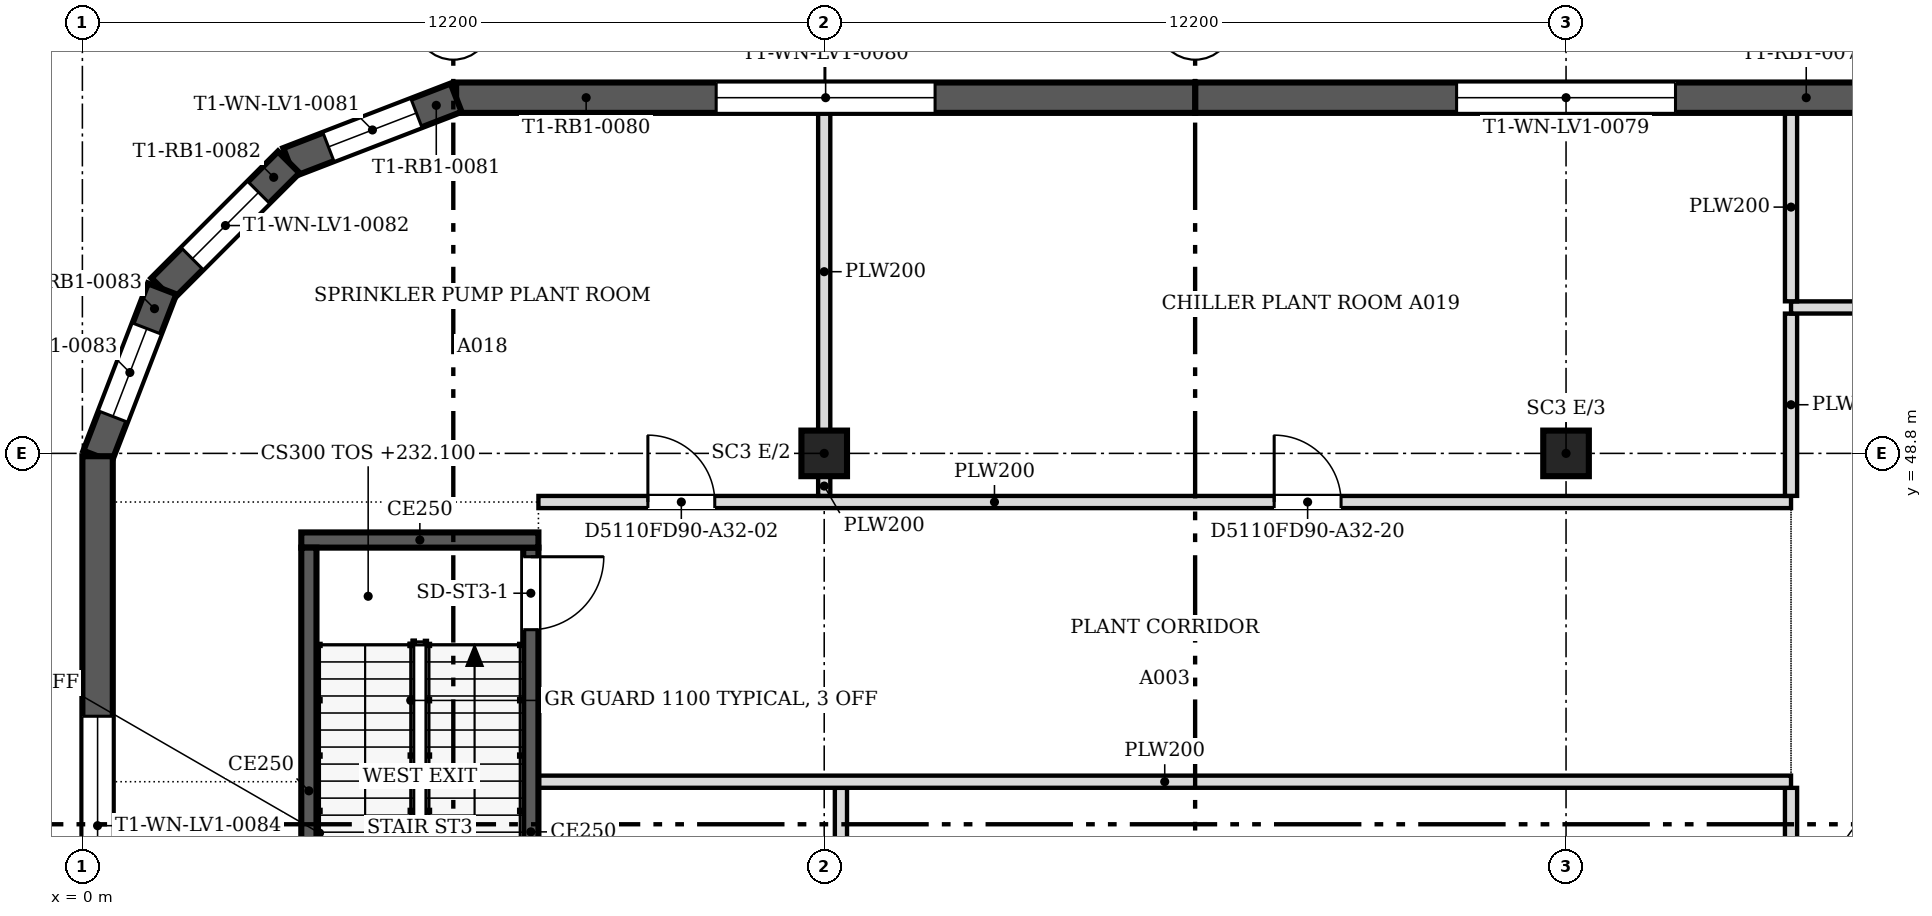
"""IFC4 building model, lengths in metres.
Left out: names, types, materials, properties, quantities, classifications, styles, units other than length and angle.
Written with IfcOpenShell. Run it as: python <this file> out.ifc"""

import sys

from ifc_helpers import new_model, si_unit, direction, frame, frame_2d, origin, origin_2d, place, context, subcontext, project, spatial, polyline, rectangle, outline, extrude, faceted_brep, source, transform, mapped, element, fill, save


model = new_model("IFC4")
c1 = context("Model", 3, precision=1e-05, world=origin(), true_north=direction((0.0, 1.0)))
c2 = subcontext(c1, "Body", "Model", "MODEL_VIEW")
j1 = project(units=[si_unit("LENGTHUNIT", "METRE"), si_unit("PLANEANGLEUNIT", "RADIAN")], contexts=[c1])
p1 = place(None, origin())
s1 = spatial("IfcSite", under=j1, at=p1, CompositionType="ELEMENT")
p2 = place(p1, origin())
s2 = spatial("IfcBuilding", under=s1, at=p2, CompositionType="ELEMENT")
p3 = place(p2, frame((0.0, 0.0, 232.1)))
s3 = spatial("IfcBuildingStorey", under=s2, at=p3, CompositionType="ELEMENT", Elevation=232.1)
for number, where, z_axis, x_axis in (
    (1, (12.2, 48.8, 0.0), (0.0, 0.0, 1.0), (1.0, 0.0, 0.0)),
    (2, (24.4, 48.8, 0.0), (0.0, 0.0, 1.0), (1.0, 0.0, 0.0)),
):
    element("IfcColumn", number, at=place(p3, frame(where, z_axis=z_axis, x_axis=x_axis)), inside=s3, PredefinedType="COLUMN", context=c2, shape_type="SweptSolid", body=[
        extrude(rectangle(XDim=0.75, YDim=0.75, at=origin_2d()), origin(), (0.0, 0.0, 1.0), 4.6),
    ])
m1 = source(origin(), c2, "Body", "SweptSolid", [
    extrude(outline(polyline([(0.0, 0.0), (12.2, 0.0), (12.2, 4.8), (0.0, 4.8), (0.0, 0.0)])), frame((0.0, 0.25, 0.0), z_axis=(0.0, -1.0, 0.0), x_axis=(1.0, 0.0, 0.0)), (0.0, 0.0, 1.0), 0.5),
])
p4 = place(p3, frame((30.5, 54.65, 0.0), z_axis=(0.0, 0.0, 1.0), x_axis=(-1.0, 0.0, 0.0)))
e3 = element("IfcWall", 3, at=p4, inside=s3, PredefinedType="SOLIDWALL", context=c2, shape_type="MappedRepresentation", body=[
    mapped(m1, transform((0.0, 0.0, 0.0), scale=1.0)),
])
m2 = source(origin(), c2, "Body", "SweptSolid", [
    extrude(outline(polyline([(4.3, 0.8), (7.9, 0.8), (7.9, 4.0), (4.3, 4.0), (4.3, 0.8)])), frame((0.0, 0.26, 0.0), z_axis=(0.0, -1.0, 0.0), x_axis=(1.0, 0.0, 0.0)), (0.0, 0.0, 1.0), 0.52),
])
p5 = place(p4, origin())
e4 = element("IfcOpeningElement", 4, at=p5, cuts=e3, PredefinedType="OPENING", context=c2, shape_type="MappedRepresentation", body=[
    mapped(m2, transform((0.0, 0.0, 0.0), scale=1.0)),
])
m3 = source(origin(), c2, "Body", "Brep", [
    faceted_brep([(0.0, -0.25, 0.0), (12.154, -0.25, 0.0), (12.154, -0.25, 4.8), (0.0, -0.25, 4.8), (0.0, 0.25, 4.8), (12.107, 0.25, 4.8), (12.107, 0.25, 0.0), (0.0, 0.25, 0.0), (12.154, -0.0, 0.0), (12.154, -0.0, 4.8)], [[[0, 1, 2, 3]], [[4, 5, 6, 7]], [[7, 6, 8, 1, 0]], [[9, 2, 1, 8]], [[5, 4, 3, 2, 9]], [[4, 7, 0, 3]], [[8, 6, 5, 9]]]),
])
p6 = place(p3, frame((18.3, 54.65, 0.0), z_axis=(0.0, 0.0, 1.0), x_axis=(-1.0, 0.0, 0.0)))
e5 = element("IfcWall", 5, at=p6, inside=s3, PredefinedType="SOLIDWALL", context=c2, shape_type="MappedRepresentation", body=[
    mapped(m3, transform((0.0, 0.0, 0.0), scale=1.0)),
])
m4 = source(origin(), c2, "Body", "SweptSolid", [
    extrude(outline(polyline([(4.277, 0.8), (7.877, 0.8), (7.877, 4.0), (4.277, 4.0), (4.277, 0.8)])), frame((0.0, 0.26, 0.0), z_axis=(0.0, -1.0, 0.0), x_axis=(1.0, 0.0, 0.0)), (0.0, 0.0, 1.0), 0.52),
])
p7 = place(p6, origin())
e6 = element("IfcOpeningElement", 6, at=p7, cuts=e5, PredefinedType="OPENING", context=c2, shape_type="MappedRepresentation", body=[
    mapped(m4, transform((0.0, 0.0, 0.0), scale=1.0)),
])
m5 = source(origin(), c2, "Body", "Brep", [
    faceted_brep([(0.0, -0.25, 0.0), (2.95, -0.25, 0.0), (2.95, -0.25, 4.8), (0.0, -0.25, 4.8), (0.047, 0.25, 4.8), (2.898, 0.25, 4.8), (2.898, 0.25, 0.0), (0.047, 0.25, 0.0), (2.95, 0.0, 0.0), (0.0, 0.0, 0.0), (2.95, 0.0, 4.8), (0.0, 0.0, 4.8)], [[[0, 1, 2, 3]], [[4, 5, 6, 7]], [[7, 6, 8, 1, 0, 9]], [[10, 2, 1, 8]], [[5, 4, 11, 3, 2, 10]], [[9, 0, 3, 11]], [[7, 9, 11, 4]], [[8, 6, 5, 10]]]),
])
p8 = place(p3, frame((6.146, 54.65, 0.0), z_axis=(0.0, 0.0, 1.0), x_axis=(-0.932999673775, -0.359877213415, 0.0)))
e7 = element("IfcWall", 7, at=p8, inside=s3, PredefinedType="SOLIDWALL", context=c2, shape_type="MappedRepresentation", body=[
    mapped(m5, transform((0.0, 0.0, 0.0), scale=1.0)),
])
m6 = source(origin(), c2, "Body", "SweptSolid", [
    extrude(outline(polyline([(0.7, 0.8), (2.25, 0.8), (2.25, 4.0), (0.7, 4.0), (0.7, 0.8)])), frame((0.0, 0.26, 0.0), z_axis=(0.0, -1.0, 0.0), x_axis=(1.0, 0.0, 0.0)), (0.0, 0.0, 1.0), 0.52),
])
p9 = place(p8, origin())
e8 = element("IfcOpeningElement", 8, at=p9, cuts=e7, PredefinedType="OPENING", context=c2, shape_type="MappedRepresentation", body=[
    mapped(m6, transform((0.0, 0.0, 0.0), scale=1.0)),
])
m7 = source(origin(), c2, "Body", "Brep", [
    faceted_brep([(0.0, -0.25, 0.0), (2.944, -0.25, 0.0), (2.944, -0.25, 4.8), (0.0, -0.25, 4.8), (0.053, 0.25, 4.8), (2.891, 0.25, 4.8), (2.891, 0.25, 0.0), (0.053, 0.25, 0.0), (2.944, 0.0, 0.0), (0.0, 0.0, 0.0), (2.944, 0.0, 4.8), (0.0, 0.0, 4.8)], [[[0, 1, 2, 3]], [[4, 5, 6, 7]], [[7, 6, 8, 1, 0, 9]], [[10, 2, 1, 8]], [[5, 4, 11, 3, 2, 10]], [[9, 0, 3, 11]], [[7, 9, 11, 4]], [[8, 6, 5, 10]]]),
])
p10 = place(p3, frame((3.394, 53.588, 0.0), z_axis=(0.0, 0.0, 1.0), x_axis=(-0.707106781187, -0.707106781187, 0.0)))
e9 = element("IfcWall", 9, at=p10, inside=s3, PredefinedType="SOLIDWALL", context=c2, shape_type="MappedRepresentation", body=[
    mapped(m7, transform((0.0, 0.0, 0.0), scale=1.0)),
])
m8 = source(origin(), c2, "Body", "SweptSolid", [
    extrude(outline(polyline([(0.7, 0.8), (2.244, 0.8), (2.244, 4.0), (0.7, 4.0), (0.7, 0.8)])), frame((0.0, 0.26, 0.0), z_axis=(0.0, -1.0, 0.0), x_axis=(1.0, 0.0, 0.0)), (0.0, 0.0, 1.0), 0.52),
])
p11 = place(p10, origin())
e10 = element("IfcOpeningElement", 10, at=p11, cuts=e9, PredefinedType="OPENING", context=c2, shape_type="MappedRepresentation", body=[
    mapped(m8, transform((0.0, 0.0, 0.0), scale=1.0)),
])
m9 = source(origin(), c2, "Body", "Brep", [
    faceted_brep([(0.0, -0.25, 0.0), (2.95, -0.25, 0.0), (2.95, -0.25, 4.8), (0.0, -0.25, 4.8), (0.053, 0.25, 4.8), (2.904, 0.25, 4.8), (2.904, 0.25, 0.0), (0.053, 0.25, 0.0), (2.95, 0.0, 0.0), (0.0, 0.0, 0.0), (2.95, 0.0, 4.8), (0.0, 0.0, 4.8)], [[[0, 1, 2, 3]], [[4, 5, 6, 7]], [[7, 6, 8, 1, 0, 9]], [[10, 2, 1, 8]], [[5, 4, 11, 3, 2, 10]], [[9, 0, 3, 11]], [[7, 9, 11, 4]], [[8, 6, 5, 10]]]),
])
p12 = place(p3, frame((1.312, 51.506, 0.0), z_axis=(0.0, 0.0, 1.0), x_axis=(-0.359921456299, -0.932982607178, 0.0)))
e11 = element("IfcWall", 11, at=p12, inside=s3, PredefinedType="SOLIDWALL", context=c2, shape_type="MappedRepresentation", body=[
    mapped(m9, transform((0.0, 0.0, 0.0), scale=1.0)),
])
p13 = place(p12, origin())
e12 = element("IfcOpeningElement", 12, at=p13, cuts=e11, PredefinedType="OPENING", context=c2, shape_type="MappedRepresentation", body=[
    mapped(m6, transform((0.0, 0.0, 0.0), scale=1.0)),
])
m10 = source(origin(), c2, "Body", "Brep", [
    faceted_brep([(0.0, -0.25, 0.0), (12.154, -0.25, 0.0), (12.154, -0.25, 4.8), (0.0, -0.25, 4.8), (0.047, 0.25, 4.8), (12.154, 0.25, 4.8), (12.154, 0.25, 0.0), (0.047, 0.25, 0.0), (0.0, 0.0, 0.0), (0.0, 0.0, 4.8)], [[[0, 1, 2, 3]], [[4, 5, 6, 7]], [[7, 6, 1, 0, 8]], [[5, 4, 9, 3, 2]], [[8, 0, 3, 9]], [[7, 8, 9, 4]], [[1, 6, 5, 2]]]),
])
p14 = place(p3, frame((0.25, 48.753, 0.0), z_axis=(0.0, 0.0, 1.0), x_axis=(0.0, -1.0, 0.0)))
e13 = element("IfcWall", 13, at=p14, inside=s3, PredefinedType="SOLIDWALL", context=c2, shape_type="MappedRepresentation", body=[
    mapped(m10, transform((0.0, 0.0, 0.0), scale=1.0)),
])
p15 = place(p14, origin())
e14 = element("IfcOpeningElement", 14, at=p15, cuts=e13, PredefinedType="OPENING", context=c2, shape_type="MappedRepresentation", body=[
    mapped(m4, transform((0.0, 0.0, 0.0), scale=1.0)),
])
p16 = place(p3, frame((3.725, 39.25, 0.0), z_axis=(0.0, 0.0, 1.0), x_axis=(0.0, 1.0, 0.0)))
e15 = element("IfcWall", 15, at=p16, inside=s3, PredefinedType="SOLIDWALL", context=c2, shape_type="SweptSolid", body=[
    extrude(rectangle(XDim=8.0, YDim=0.25, at=frame_2d((4.0, 0.0))), origin(), (0.0, 0.0, 1.0), 4.8),
])
p17 = place(p3, frame((3.6, 47.375, 0.0), z_axis=(0.0, 0.0, 1.0), x_axis=(1.0, 0.0, 0.0)))
e16 = element("IfcWall", 16, at=p17, inside=s3, PredefinedType="SOLIDWALL", context=c2, shape_type="SweptSolid", body=[
    extrude(rectangle(XDim=3.9, YDim=0.25, at=frame_2d((1.95, 0.0))), origin(), (0.0, 0.0, 1.0), 4.8),
])
p18 = place(p3, frame((7.375, 47.25, 0.0), z_axis=(0.0, 0.0, 1.0), x_axis=(0.0, -1.0, 0.0)))
e17 = element("IfcWall", 17, at=p18, inside=s3, PredefinedType="SOLIDWALL", context=c2, shape_type="SweptSolid", body=[
    extrude(rectangle(XDim=8.0, YDim=0.25, at=frame_2d((4.0, 0.0))), origin(), (0.0, 0.0, 1.0), 4.8),
])
m11 = source(origin(), c2, "Body", "SweptSolid", [
    extrude(rectangle(XDim=1.2, YDim=2.1, at=frame_2d((0.6, 1.05))), frame((0.0, 0.135, 0.0), z_axis=(0.0, -1.0, 0.0), x_axis=(1.0, 0.0, 0.0)), (0.0, 0.0, 1.0), 0.27),
])
p19 = place(p18, frame((0.15, 0.0, 0.0)))
e18 = element("IfcOpeningElement", 18, at=p19, cuts=e17, PredefinedType="OPENING", context=c2, shape_type="MappedRepresentation", body=[
    mapped(m11, transform((0.0, 0.0, 0.0), scale=1.0)),
])
p20 = place(p3, frame((12.475, 37.0, 0.0), z_axis=(0.0, 0.0, 1.0), x_axis=(0.0, 1.0, 0.0)))
e19 = element("IfcWall", 19, at=p20, inside=s3, PredefinedType="PARTITIONING", context=c2, shape_type="SweptSolid", body=[
    extrude(rectangle(XDim=6.299, YDim=0.2, at=frame_2d((3.149, 0.0))), origin(), (0.0, 0.0, 1.0), 3.817),
])
m12 = source(origin(), c2, "Body", "SweptSolid", [
    extrude(rectangle(XDim=1.1, YDim=2.1, at=frame_2d((0.55, 1.05))), frame((0.0, 0.11, 0.0), z_axis=(0.0, -1.0, 0.0), x_axis=(1.0, 0.0, 0.0)), (0.0, 0.0, 1.0), 0.22),
])
p21 = place(p20, frame((2.6, 0.0, 0.0)))
e20 = element("IfcOpeningElement", 20, at=p21, cuts=e19, PredefinedType="OPENING", context=c2, shape_type="MappedRepresentation", body=[
    mapped(m12, transform((0.0, 0.0, 0.0), scale=1.0)),
])
p22 = place(p3, frame((28.1, 37.0, 0.0), z_axis=(0.0, 0.0, 1.0), x_axis=(0.0, 1.0, 0.0)))
e21 = element("IfcWall", 21, at=p22, inside=s3, PredefinedType="PARTITIONING", context=c2, shape_type="SweptSolid", body=[
    extrude(rectangle(XDim=6.299, YDim=0.2, at=frame_2d((3.149, 0.0))), origin(), (0.0, 0.0, 1.0), 3.817),
])
p23 = place(p22, frame((2.6, 0.0, 0.0)))
e22 = element("IfcOpeningElement", 22, at=p23, cuts=e21, PredefinedType="OPENING", context=c2, shape_type="MappedRepresentation", body=[
    mapped(m12, transform((0.0, 0.0, 0.0), scale=1.0)),
])
p24 = place(p3, frame((7.5, 43.4, 0.0), z_axis=(0.0, 0.0, 1.0), x_axis=(1.0, 0.0, 0.0)))
e23 = element("IfcWall", 23, at=p24, inside=s3, PredefinedType="PARTITIONING", context=c2, shape_type="SweptSolid", body=[
    extrude(rectangle(XDim=20.6, YDim=0.2, at=frame_2d((10.3, 0.0))), origin(), (0.0, 0.0, 1.0), 3.817),
])
p25 = place(p3, frame((7.5, 48.0, 0.0), z_axis=(0.0, 0.0, 1.0), x_axis=(1.0, 0.0, 0.0)))
e24 = element("IfcWall", 24, at=p25, inside=s3, PredefinedType="PARTITIONING", context=c2, shape_type="SweptSolid", body=[
    extrude(rectangle(XDim=20.6, YDim=0.2, at=frame_2d((10.3, 0.0))), origin(), (0.0, 0.0, 1.0), 3.817),
])
p26 = place(p25, frame((1.8, 0.0, 0.0)))
e25 = element("IfcOpeningElement", 25, at=p26, cuts=e24, PredefinedType="OPENING", context=c2, shape_type="MappedRepresentation", body=[
    mapped(m12, transform((0.0, 0.0, 0.0), scale=1.0)),
])
p27 = place(p25, frame((12.1, 0.0, 0.0)))
e26 = element("IfcOpeningElement", 26, at=p27, cuts=e24, PredefinedType="OPENING", context=c2, shape_type="MappedRepresentation", body=[
    mapped(m12, transform((0.0, 0.0, 0.0), scale=1.0)),
])
p28 = place(p3, frame((12.2, 48.101, 0.0), z_axis=(0.0, 0.0, 1.0), x_axis=(0.0, 1.0, 0.0)))
e27 = element("IfcWall", 27, at=p28, inside=s3, PredefinedType="PARTITIONING", context=c2, shape_type="SweptSolid", body=[
    extrude(rectangle(XDim=0.323, YDim=0.2, at=frame_2d((0.162, 0.0))), origin(), (0.0, 0.0, 1.0), 3.817),
])
p29 = place(p3, frame((28.1, 48.101, 0.0), z_axis=(0.0, 0.0, 1.0), x_axis=(0.0, 1.0, 0.0)))
e28 = element("IfcWall", 28, at=p29, inside=s3, PredefinedType="PARTITIONING", context=c2, shape_type="SweptSolid", body=[
    extrude(rectangle(XDim=2.998, YDim=0.2, at=frame_2d((1.499, 0.0))), origin(), (0.0, 0.0, 1.0), 3.817),
])
p30 = place(p3, frame((12.2, 49.176, 0.0), z_axis=(0.0, 0.0, 1.0), x_axis=(0.0, 1.0, 0.0)))
e29 = element("IfcWall", 29, at=p30, inside=s3, PredefinedType="PARTITIONING", context=c2, shape_type="SweptSolid", body=[
    extrude(rectangle(XDim=5.224, YDim=0.2, at=frame_2d((2.612, 0.0))), origin(), (0.0, 0.0, 1.0), 3.817),
])
p31 = place(p3, frame((28.1, 51.2, 0.0), z_axis=(0.0, 0.0, 1.0), x_axis=(1.0, 0.0, 0.0)))
e30 = element("IfcWall", 30, at=p31, inside=s3, PredefinedType="PARTITIONING", context=c2, shape_type="SweptSolid", body=[
    extrude(rectangle(XDim=31.413, YDim=0.2, at=frame_2d((15.707, 0.0))), origin(), (0.0, 0.0, 1.0), 3.817),
])
p32 = place(p31, frame((17.401, 0.0, 0.0)))
e31 = element("IfcOpeningElement", 31, at=p32, cuts=e30, PredefinedType="OPENING", context=c2, shape_type="MappedRepresentation", body=[
    mapped(m12, transform((0.0, 0.0, 0.0), scale=1.0)),
])
p33 = place(p31, frame((2.4, 0.0, 0.0)))
e32 = element("IfcOpeningElement", 32, at=p33, cuts=e30, PredefinedType="OPENING", context=c2, shape_type="MappedRepresentation", body=[
    mapped(m12, transform((0.0, 0.0, 0.0), scale=1.0)),
])
p34 = place(p31, frame((9.9, 0.0, 0.0)))
e33 = element("IfcOpeningElement", 33, at=p34, cuts=e30, PredefinedType="OPENING", context=c2, shape_type="MappedRepresentation", body=[
    mapped(m12, transform((0.0, 0.0, 0.0), scale=1.0)),
])
p35 = place(p31, frame((25.7, 0.0, 0.0)))
e34 = element("IfcOpeningElement", 34, at=p35, cuts=e30, PredefinedType="OPENING", context=c2, shape_type="MappedRepresentation", body=[
    mapped(m12, transform((0.0, 0.0, 0.0), scale=1.0)),
])
p36 = place(p3, frame((28.1, 51.301, 0.0), z_axis=(0.0, 0.0, 1.0), x_axis=(0.0, 1.0, 0.0)))
e35 = element("IfcWall", 35, at=p36, inside=s3, PredefinedType="PARTITIONING", context=c2, shape_type="SweptSolid", body=[
    extrude(rectangle(XDim=3.099, YDim=0.2, at=frame_2d((1.549, 0.0))), origin(), (0.0, 0.0, 1.0), 3.817),
])
m13 = source(origin(), c2, "Body", "SweptSolid", [
    extrude(outline(polyline([(4.3, 0.8), (7.9, 0.8), (7.9, 4.0), (4.3, 4.0), (4.3, 0.8)])), frame((0.0, 0.03, 0.0), z_axis=(0.0, -1.0, 0.0), x_axis=(1.0, 0.0, 0.0)), (0.0, 0.0, 1.0), 0.06),
])
p37 = place(p5, origin())
e36 = element("IfcWindow", 36, at=p37, inside=s3, PartitioningType="USERDEFINED", PredefinedType="WINDOW", context=c2, shape_type="MappedRepresentation", body=[
    mapped(m13, transform((0.0, 0.0, 0.0), scale=1.0)),
])
fill(e4, e36)
m14 = source(origin(), c2, "Body", "SweptSolid", [
    extrude(outline(polyline([(4.277, 0.8), (7.877, 0.8), (7.877, 4.0), (4.277, 4.0), (4.277, 0.8)])), frame((0.0, 0.03, 0.0), z_axis=(0.0, -1.0, 0.0), x_axis=(1.0, 0.0, 0.0)), (0.0, 0.0, 1.0), 0.06),
])
p38 = place(p7, origin())
e37 = element("IfcWindow", 37, at=p38, inside=s3, PartitioningType="USERDEFINED", PredefinedType="WINDOW", context=c2, shape_type="MappedRepresentation", body=[
    mapped(m14, transform((0.0, 0.0, 0.0), scale=1.0)),
])
fill(e6, e37)
m15 = source(origin(), c2, "Body", "SweptSolid", [
    extrude(outline(polyline([(0.7, 0.8), (2.25, 0.8), (2.25, 4.0), (0.7, 4.0), (0.7, 0.8)])), frame((0.0, 0.03, 0.0), z_axis=(0.0, -1.0, 0.0), x_axis=(1.0, 0.0, 0.0)), (0.0, 0.0, 1.0), 0.06),
])
p39 = place(p9, origin())
e38 = element("IfcWindow", 38, at=p39, inside=s3, PartitioningType="USERDEFINED", PredefinedType="WINDOW", context=c2, shape_type="MappedRepresentation", body=[
    mapped(m15, transform((0.0, 0.0, 0.0), scale=1.0)),
])
fill(e8, e38)
m16 = source(origin(), c2, "Body", "SweptSolid", [
    extrude(outline(polyline([(0.7, 0.8), (2.244, 0.8), (2.244, 4.0), (0.7, 4.0), (0.7, 0.8)])), frame((0.0, 0.03, 0.0), z_axis=(0.0, -1.0, 0.0), x_axis=(1.0, 0.0, 0.0)), (0.0, 0.0, 1.0), 0.06),
])
p40 = place(p11, origin())
e39 = element("IfcWindow", 39, at=p40, inside=s3, PartitioningType="USERDEFINED", PredefinedType="WINDOW", context=c2, shape_type="MappedRepresentation", body=[
    mapped(m16, transform((0.0, 0.0, 0.0), scale=1.0)),
])
fill(e10, e39)
p41 = place(p13, origin())
e40 = element("IfcWindow", 40, at=p41, inside=s3, PartitioningType="USERDEFINED", PredefinedType="WINDOW", context=c2, shape_type="MappedRepresentation", body=[
    mapped(m15, transform((0.0, 0.0, 0.0), scale=1.0)),
])
fill(e12, e40)
p42 = place(p15, origin())
e41 = element("IfcWindow", 41, at=p42, inside=s3, PartitioningType="USERDEFINED", PredefinedType="WINDOW", context=c2, shape_type="MappedRepresentation", body=[
    mapped(m14, transform((0.0, 0.0, 0.0), scale=1.0)),
])
fill(e14, e41)
m17 = source(origin(), c2, "Body", "SweptSolid", [
    extrude(rectangle(XDim=1.2, YDim=2.1, at=frame_2d((0.6, 1.05))), frame((0.0, 0.025, 0.0), z_axis=(0.0, -1.0, 0.0), x_axis=(1.0, 0.0, 0.0)), (0.0, 0.0, 1.0), 0.05),
])
p43 = place(p19, origin())
e42 = element("IfcDoor", 42, at=p43, inside=s3, OperationType="SINGLE_SWING_LEFT", PredefinedType="DOOR", context=c2, shape_type="MappedRepresentation", body=[
    mapped(m17, transform((0.0, 0.0, 0.0), scale=1.0)),
])
fill(e18, e42)
m18 = source(origin(), c2, "Body", "SweptSolid", [
    extrude(rectangle(XDim=1.1, YDim=2.1, at=frame_2d((0.55, 1.05))), frame((0.0, 0.025, 0.0), z_axis=(0.0, -1.0, 0.0), x_axis=(1.0, 0.0, 0.0)), (0.0, 0.0, 1.0), 0.05),
])
p44 = place(p26, origin())
e43 = element("IfcDoor", 43, at=p44, inside=s3, OperationType="SINGLE_SWING_LEFT", PredefinedType="DOOR", context=c2, shape_type="MappedRepresentation", body=[
    mapped(m18, transform((0.0, 0.0, 0.0), scale=1.0)),
])
fill(e25, e43)
p45 = place(p27, origin())
e44 = element("IfcDoor", 44, at=p45, inside=s3, OperationType="SINGLE_SWING_LEFT", PredefinedType="DOOR", context=c2, shape_type="MappedRepresentation", body=[
    mapped(m18, transform((0.0, 0.0, 0.0), scale=1.0)),
])
fill(e26, e44)
save(model, sys.argv[1])
